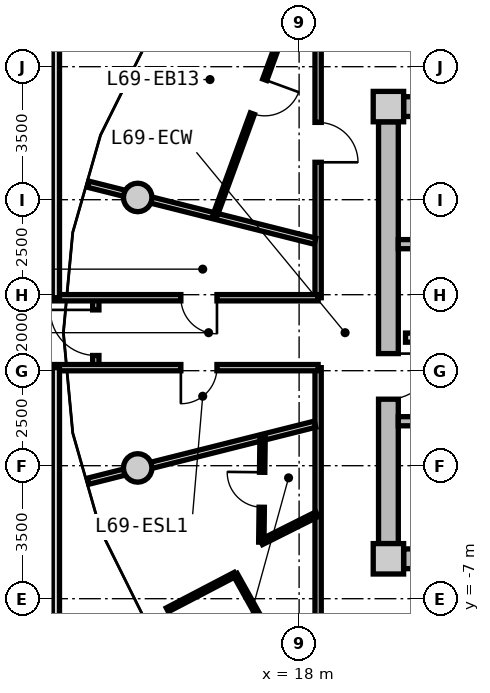
"""IFC4 building model, lengths in metres.
Left out: names, types, materials, properties, quantities, classifications, styles, units other than length and angle.
Written with IfcOpenShell. Run it as: python <this file> out.ifc"""

import sys

from ifc_helpers import new_model, si_unit, direction, frame, frame_2d, origin, origin_2d, place, context, subcontext, project, spatial, rectangle, circle, extrude, source, transform, mapped, element, fill, save


model = new_model("IFC4")
c1 = context("Model", 3, precision=1e-05, world=origin(), true_north=direction((0.0, 1.0)))
c2 = subcontext(c1, "Body", "Model", "MODEL_VIEW")
j1 = project(units=[si_unit("LENGTHUNIT", "METRE"), si_unit("PLANEANGLEUNIT", "RADIAN")], contexts=[c1])
p1 = place(None, origin())
s1 = spatial("IfcSite", under=j1, at=p1, CompositionType="ELEMENT")
p2 = place(p1, origin())
s2 = spatial("IfcBuilding", under=s1, at=p2, CompositionType="ELEMENT")
p3 = place(p2, frame((0.0, 0.0, 223.05)))
s3 = spatial("IfcBuildingStorey", under=s2, at=p3, CompositionType="ELEMENT", Elevation=223.05)
m1 = source(origin(), c2, "Body", "SweptSolid", [
    extrude(rectangle(XDim=0.8, YDim=0.8, at=origin_2d()), origin(), (0.0, 0.0, 1.0), 3.05),
])
for number, where, z_axis, x_axis in (
    (1, (20.35, -5.95, 0.0), (0.0, 0.0, 1.0), (1.0, 0.0, 0.0)),
    (2, (20.35, 5.95, 0.0), (0.0, 0.0, 1.0), (1.0, 0.0, 0.0)),
):
    element("IfcColumn", number, at=place(p3, frame(where, z_axis=z_axis, x_axis=x_axis)), inside=s3, PredefinedType="COLUMN", context=c2, shape_type="MappedRepresentation", body=[
        mapped(m1, transform((0.0, 0.0, 0.0), x_axis=(1.0, 0.0, 0.0), y_axis=(0.0, 1.0, 0.0), z_axis=(0.0, 0.0, 1.0), scale=1.0)),
    ])
m2 = source(origin(), c2, "Body", "SweptSolid", [
    extrude(rectangle(XDim=14.5, YDim=0.52, at=frame_2d((7.25, 0.0))), origin(), (0.0, 0.0, 1.0), 2.76),
])
for number, where, z_axis, x_axis in (
    (3, (20.75, 5.95, 0.0), (0.0, 0.0, 1.0), (1.0, 0.0, 0.0)),
    (4, (35.25, -5.95, 0.0), (0.0, 0.0, 1.0), (-1.0, 0.0, 0.0)),
):
    element("IfcWall", number, at=place(p3, frame(where, z_axis=z_axis, x_axis=x_axis)), inside=s3, PredefinedType="SHEAR", context=c2, shape_type="MappedRepresentation", body=[
        mapped(m2, transform((0.0, 0.0, 0.0), x_axis=(1.0, 0.0, 0.0), y_axis=(0.0, 1.0, 0.0), z_axis=(0.0, 0.0, 1.0), scale=1.0)),
    ])
m3 = source(origin(), c2, "Body", "SweptSolid", [
    extrude(rectangle(XDim=11.1, YDim=0.52, at=frame_2d((5.55, 0.0))), origin(), (0.0, 0.0, 1.0), 2.76),
])
p4 = place(p3, frame((20.35, -5.55, 0.0), z_axis=(0.0, 0.0, 1.0), x_axis=(0.0, 1.0, 0.0)))
e5 = element("IfcWall", 5, at=p4, inside=s3, PredefinedType="SHEAR", context=c2, shape_type="MappedRepresentation", body=[
    mapped(m3, transform((0.0, 0.0, 0.0), x_axis=(1.0, 0.0, 0.0), y_axis=(0.0, 1.0, 0.0), z_axis=(0.0, 0.0, 1.0), scale=1.0)),
])
p5 = place(p4, frame((3.8, 0.0, 0.0)))
e6 = element("IfcOpeningElement", 6, at=p5, cuts=e5, PredefinedType="OPENING", context=c2, shape_type="SweptSolid", body=[
    extrude(rectangle(XDim=1.2, YDim=2.15, at=frame_2d((0.6, 1.075))), frame((0.0, 0.27, 0.0), z_axis=(0.0, -1.0, 0.0), x_axis=(1.0, 0.0, 0.0)), (0.0, 0.0, 1.0), 0.54),
])
m4 = source(origin(), c2, "Body", "SweptSolid", [
    extrude(circle(Radius=0.375, at=origin_2d()), origin(), (0.0, 0.0, 1.0), 3.05),
])
for number, where, z_axis, x_axis in (
    (7, (13.753, 3.559, 0.0), (0.0, 0.0, 1.0), (1.0, 0.0, 0.0)),
    (8, (13.753, -3.559, 0.0), (0.0, 0.0, 1.0), (1.0, 0.0, 0.0)),
):
    element("IfcColumn", number, at=place(p3, frame(where, z_axis=z_axis, x_axis=x_axis)), inside=s3, PredefinedType="COLUMN", context=c2, shape_type="MappedRepresentation", body=[
        mapped(m4, transform((0.0, 0.0, 0.0), x_axis=(1.0, 0.0, 0.0), y_axis=(0.0, 1.0, 0.0), z_axis=(0.0, 0.0, 1.0), scale=1.0)),
    ])
m5 = source(origin(), c2, "Body", "SweptSolid", [
    extrude(rectangle(XDim=7.93, YDim=0.24, at=frame_2d((3.965, 0.0))), origin(), (0.0, 0.0, 1.0), 2.76),
])
p6 = place(p3, frame((20.61, 2.33, 0.0), z_axis=(0.0, 0.0, 1.0), x_axis=(1.0, 0.0, 0.0)))
e9 = element("IfcWall", 9, at=p6, inside=s3, PredefinedType="PARTITIONING", context=c2, shape_type="MappedRepresentation", body=[
    mapped(m5, transform((0.0, 0.0, 0.0), x_axis=(1.0, 0.0, 0.0), y_axis=(0.0, 1.0, 0.0), z_axis=(0.0, 0.0, 1.0), scale=1.0)),
])
p7 = place(p3, frame((20.61, -2.33, 0.0), z_axis=(0.0, 0.0, 1.0), x_axis=(1.0, 0.0, 0.0)))
e10 = element("IfcWall", 10, at=p7, inside=s3, PredefinedType="PARTITIONING", context=c2, shape_type="MappedRepresentation", body=[
    mapped(m5, transform((0.0, 0.0, 0.0), x_axis=(1.0, 0.0, 0.0), y_axis=(0.0, 1.0, 0.0), z_axis=(0.0, 0.0, 1.0), scale=1.0)),
])
p8 = place(p7, frame((1.05, 0.0, 0.0)))
e11 = element("IfcOpeningElement", 11, at=p8, cuts=e10, PredefinedType="OPENING", context=c2, shape_type="SweptSolid", body=[
    extrude(rectangle(XDim=1.1, YDim=2.15, at=frame_2d((0.55, 1.075))), frame((0.0, 0.13, 0.0), z_axis=(0.0, -1.0, 0.0), x_axis=(1.0, 0.0, 0.0)), (0.0, 0.0, 1.0), 0.26),
])
m6 = source(origin(), c2, "Body", "SweptSolid", [
    extrude(rectangle(XDim=7.62, YDim=0.24, at=frame_2d((3.81, 0.0))), origin(), (0.0, 0.0, 1.0), 2.745),
])
p9 = place(p3, frame((20.8, -0.13, 0.0), z_axis=(0.0, 0.0, 1.0), x_axis=(1.0, 0.0, 0.0)))
e12 = element("IfcWall", 12, at=p9, inside=s3, PredefinedType="PARTITIONING", context=c2, shape_type="MappedRepresentation", body=[
    mapped(m6, transform((0.0, 0.0, 0.0), x_axis=(1.0, 0.0, 0.0), y_axis=(0.0, 1.0, 0.0), z_axis=(0.0, 0.0, 1.0), scale=1.0)),
])
p10 = place(p9, frame((6.22, 0.0, 0.0)))
e13 = element("IfcOpeningElement", 13, at=p10, cuts=e12, PredefinedType="OPENING", context=c2, shape_type="SweptSolid", body=[
    extrude(rectangle(XDim=1.0, YDim=2.1, at=frame_2d((0.5, 1.05))), frame((0.0, 0.13, 0.0), z_axis=(0.0, -1.0, 0.0), x_axis=(1.0, 0.0, 0.0)), (0.0, 0.0, 1.0), 0.26),
])
p11 = place(p9, frame((2.4, 0.0, 0.0)))
e14 = element("IfcOpeningElement", 14, at=p11, cuts=e12, PredefinedType="OPENING", context=c2, shape_type="SweptSolid", body=[
    extrude(rectangle(XDim=1.0, YDim=2.1, at=frame_2d((0.5, 1.05))), frame((0.0, 0.13, 0.0), z_axis=(0.0, -1.0, 0.0), x_axis=(1.0, 0.0, 0.0)), (0.0, 0.0, 1.0), 0.26),
])
m7 = source(origin(), c2, "Body", "SweptSolid", [
    extrude(rectangle(XDim=6.88, YDim=0.165, at=frame_2d((3.44, 0.0))), origin(), (0.0, 0.0, 1.0), 2.745),
])
p12 = place(p3, frame((18.5, -7.8, 0.0), z_axis=(0.0, 0.0, 1.0), x_axis=(0.0, 1.0, 0.0)))
e15 = element("IfcWall", 15, at=p12, inside=s3, PredefinedType="PARTITIONING", context=c2, shape_type="MappedRepresentation", body=[
    mapped(m7, transform((0.0, 0.0, 0.0), x_axis=(1.0, 0.0, 0.0), y_axis=(0.0, 1.0, 0.0), z_axis=(0.0, 0.0, 1.0), scale=1.0)),
])
p13 = place(p3, frame((18.5, 0.92, 0.0), z_axis=(0.0, 0.0, 1.0), x_axis=(0.0, 1.0, 0.0)))
e16 = element("IfcWall", 16, at=p13, inside=s3, PredefinedType="PARTITIONING", context=c2, shape_type="MappedRepresentation", body=[
    mapped(m7, transform((0.0, 0.0, 0.0), x_axis=(1.0, 0.0, 0.0), y_axis=(0.0, 1.0, 0.0), z_axis=(0.0, 0.0, 1.0), scale=1.0)),
])
p14 = place(p13, frame((3.564, 0.0, 0.0)))
e17 = element("IfcOpeningElement", 17, at=p14, cuts=e16, PredefinedType="OPENING", context=c2, shape_type="SweptSolid", body=[
    extrude(rectangle(XDim=1.05, YDim=2.15, at=frame_2d((0.525, 1.075))), frame((0.0, 0.093, 0.0), z_axis=(0.0, -1.0, 0.0), x_axis=(1.0, 0.0, 0.0)), (0.0, 0.0, 1.0), 0.185),
])
m8 = source(origin(), c2, "Body", "SweptSolid", [
    extrude(rectangle(XDim=6.157, YDim=0.165, at=frame_2d((3.079, 0.0))), origin(), (0.0, 0.0, 1.0), 2.345),
])
for number, where, z_axis, x_axis in (
    (18, (18.42, 2.407, 0.0), (0.0, 0.0, 1.0), (-0.97, 0.244, 0.0)),
    (19, (18.42, -2.407, 0.0), (0.0, 0.0, 1.0), (-0.97, -0.244, 0.0)),
):
    element("IfcWall", number, at=place(p3, frame(where, z_axis=z_axis, x_axis=x_axis)), inside=s3, PredefinedType="PARTITIONING", context=c2, shape_type="MappedRepresentation", body=[
        mapped(m8, transform((0.0, 0.0, 0.0), x_axis=(1.0, 0.0, 0.0), y_axis=(0.0, 1.0, 0.0), z_axis=(0.0, 0.0, 1.0), scale=1.0)),
    ])
m9 = source(origin(), c2, "Body", "SweptSolid", [
    extrude(rectangle(XDim=6.69, YDim=0.115, at=frame_2d((3.345, 0.0))), origin(), (0.0, 0.0, 1.0), 2.745),
])
p15 = place(p3, frame((18.083, 9.352, 0.0), z_axis=(0.0, 0.0, 1.0), x_axis=(-0.343693784919, -0.939081776102, 0.0)))
e20 = element("IfcWall", 20, at=p15, inside=s3, PredefinedType="PARTITIONING", context=c2, shape_type="MappedRepresentation", body=[
    mapped(m9, transform((0.0, 0.0, 0.0), x_axis=(1.0, 0.0, 0.0), y_axis=(0.0, 1.0, 0.0), z_axis=(0.0, 0.0, 1.0), scale=1.0)),
])
p16 = place(p15, frame((2.87, 0.0, 0.0)))
e21 = element("IfcOpeningElement", 21, at=p16, cuts=e20, PredefinedType="OPENING", context=c2, shape_type="SweptSolid", body=[
    extrude(rectangle(XDim=0.95, YDim=2.1, at=frame_2d((0.475, 1.05))), frame((0.0, 0.067, 0.0), z_axis=(0.0, -1.0, 0.0), x_axis=(1.0, 0.0, 0.0)), (0.0, 0.0, 1.0), 0.135),
])
m10 = source(origin(), c2, "Body", "SweptSolid", [
    extrude(rectangle(XDim=1.638, YDim=0.14, at=frame_2d((0.819, 0.0))), origin(), (0.0, 0.0, 1.0), 2.745),
])
p17 = place(p3, frame((18.47, -4.778, 0.0), z_axis=(0.0, 0.0, 1.0), x_axis=(-0.893919977945, -0.448226586707, 0.0)))
e22 = element("IfcWall", 22, at=p17, inside=s3, PredefinedType="PARTITIONING", context=c2, shape_type="MappedRepresentation", body=[
    mapped(m10, transform((0.0, 0.0, 0.0), x_axis=(1.0, 0.0, 0.0), y_axis=(0.0, 1.0, 0.0), z_axis=(0.0, 0.0, 1.0), scale=1.0)),
])
m11 = source(origin(), c2, "Body", "SweptSolid", [
    extrude(rectangle(XDim=2.759, YDim=0.14, at=frame_2d((1.379, 0.0))), origin(), (0.0, 0.0, 1.0), 2.745),
])
p18 = place(p3, frame((17.005, -5.513, 0.0), z_axis=(0.0, 0.0, 1.0), x_axis=(0.01194710728, 0.999928630767, 0.0)))
e23 = element("IfcWall", 23, at=p18, inside=s3, PredefinedType="PARTITIONING", context=c2, shape_type="MappedRepresentation", body=[
    mapped(m11, transform((0.0, 0.0, 0.0), x_axis=(1.0, 0.0, 0.0), y_axis=(0.0, 1.0, 0.0), z_axis=(0.0, 0.0, 1.0), scale=1.0)),
])
p19 = place(p18, frame((0.919, 0.0, 0.0)))
e24 = element("IfcOpeningElement", 24, at=p19, cuts=e23, PredefinedType="OPENING", context=c2, shape_type="SweptSolid", body=[
    extrude(rectangle(XDim=0.92, YDim=2.1, at=frame_2d((0.46, 1.05))), frame((0.0, 0.08, 0.0), z_axis=(0.0, -1.0, 0.0), x_axis=(1.0, 0.0, 0.0)), (0.0, 0.0, 1.0), 0.16),
])
m12 = source(origin(), c2, "Body", "SweptSolid", [
    extrude(rectangle(XDim=2.015, YDim=0.115, at=frame_2d((1.007, 0.0))), origin(), (0.0, 0.0, 1.0), 2.745),
])
p20 = place(p3, frame((16.318, -6.36, 0.0), z_axis=(0.0, 0.0, 1.0), x_axis=(-0.886437892009, -0.462847559797, 0.0)))
e25 = element("IfcWall", 25, at=p20, inside=s3, PredefinedType="PARTITIONING", context=c2, shape_type="MappedRepresentation", body=[
    mapped(m12, transform((0.0, 0.0, 0.0), x_axis=(1.0, 0.0, 0.0), y_axis=(0.0, 1.0, 0.0), z_axis=(0.0, 0.0, 1.0), scale=1.0)),
])
m13 = source(origin(), c2, "Body", "SweptSolid", [
    extrude(rectangle(XDim=3.493, YDim=0.115, at=frame_2d((1.746, 0.0))), origin(), (0.0, 0.0, 1.0), 2.745),
])
p21 = place(p3, frame((16.318, -6.36, 0.0), z_axis=(0.0, 0.0, 1.0), x_axis=(0.487896553961, -0.872901456427, 0.0)))
e26 = element("IfcWall", 26, at=p21, inside=s3, PredefinedType="PARTITIONING", context=c2, shape_type="MappedRepresentation", body=[
    mapped(m13, transform((0.0, 0.0, 0.0), x_axis=(1.0, 0.0, 0.0), y_axis=(0.0, 1.0, 0.0), z_axis=(0.0, 0.0, 1.0), scale=1.0)),
])
p22 = place(p21, frame((1.271, 0.0, 0.0)))
e27 = element("IfcOpeningElement", 27, at=p22, cuts=e26, PredefinedType="OPENING", context=c2, shape_type="SweptSolid", body=[
    extrude(rectangle(XDim=0.95, YDim=2.1, at=frame_2d((0.475, 1.05))), frame((0.0, 0.067, 0.0), z_axis=(0.0, -1.0, 0.0), x_axis=(1.0, 0.0, 0.0)), (0.0, 0.0, 1.0), 0.135),
])
m14 = source(origin(), c2, "Body", "SweptSolid", [
    extrude(rectangle(XDim=1.84, YDim=0.165, at=frame_2d((0.92, 0.0))), origin(), (0.0, 0.0, 1.0), 2.745),
])
p23 = place(p3, frame((12.65, -0.92, 0.0), z_axis=(0.0, 0.0, 1.0), x_axis=(0.0, 1.0, 0.0)))
e28 = element("IfcWall", 28, at=p23, inside=s3, PredefinedType="PARTITIONING", context=c2, shape_type="MappedRepresentation", body=[
    mapped(m14, transform((0.0, 0.0, 0.0), x_axis=(1.0, 0.0, 0.0), y_axis=(0.0, 1.0, 0.0), z_axis=(0.0, 0.0, 1.0), scale=1.0)),
])
p24 = place(p23, frame((0.32, 0.0, 0.0)))
e29 = element("IfcOpeningElement", 29, at=p24, cuts=e28, PredefinedType="OPENING", context=c2, shape_type="SweptSolid", body=[
    extrude(rectangle(XDim=1.2, YDim=2.15, at=frame_2d((0.6, 1.075))), frame((0.0, 0.093, 0.0), z_axis=(0.0, -1.0, 0.0), x_axis=(1.0, 0.0, 0.0)), (0.0, 0.0, 1.0), 0.185),
])
m15 = source(origin(), c2, "Body", "SweptSolid", [
    extrude(rectangle(XDim=37.0, YDim=0.165, at=frame_2d((18.5, 0.0))), origin(), (0.0, 0.0, 1.0), 2.745),
])
p25 = place(p3, frame((-18.5, -0.92, 0.0), z_axis=(0.0, 0.0, 1.0), x_axis=(1.0, 0.0, 0.0)))
e30 = element("IfcWall", 30, at=p25, inside=s3, PredefinedType="PARTITIONING", context=c2, shape_type="MappedRepresentation", body=[
    mapped(m15, transform((0.0, 0.0, 0.0), x_axis=(1.0, 0.0, 0.0), y_axis=(0.0, 1.0, 0.0), z_axis=(0.0, 0.0, 1.0), scale=1.0)),
])
p26 = place(p25, frame((2.662, 0.0, 0.0)))
e31 = element("IfcOpeningElement", 31, at=p26, cuts=e30, PredefinedType="OPENING", context=c2, shape_type="SweptSolid", body=[
    extrude(rectangle(XDim=0.95, YDim=2.1, at=frame_2d((0.475, 1.05))), frame((0.0, 0.093, 0.0), z_axis=(0.0, -1.0, 0.0), x_axis=(1.0, 0.0, 0.0)), (0.0, 0.0, 1.0), 0.185),
])
p27 = place(p25, frame((33.388, 0.0, 0.0)))
e32 = element("IfcOpeningElement", 32, at=p27, cuts=e30, PredefinedType="OPENING", context=c2, shape_type="SweptSolid", body=[
    extrude(rectangle(XDim=0.95, YDim=2.1, at=frame_2d((0.475, 1.05))), frame((0.0, 0.093, 0.0), z_axis=(0.0, -1.0, 0.0), x_axis=(1.0, 0.0, 0.0)), (0.0, 0.0, 1.0), 0.185),
])
p28 = place(p25, frame((9.075, 0.0, 0.0)))
e33 = element("IfcOpeningElement", 33, at=p28, cuts=e30, PredefinedType="OPENING", context=c2, shape_type="SweptSolid", body=[
    extrude(rectangle(XDim=1.25, YDim=2.2, at=frame_2d((0.625, 1.1))), frame((0.0, 0.093, 0.0), z_axis=(0.0, -1.0, 0.0), x_axis=(1.0, 0.0, 0.0)), (0.0, 0.0, 1.0), 0.185),
])
p29 = place(p25, frame((14.875, 0.0, 0.0)))
e34 = element("IfcOpeningElement", 34, at=p29, cuts=e30, PredefinedType="OPENING", context=c2, shape_type="SweptSolid", body=[
    extrude(rectangle(XDim=1.25, YDim=2.2, at=frame_2d((0.625, 1.1))), frame((0.0, 0.093, 0.0), z_axis=(0.0, -1.0, 0.0), x_axis=(1.0, 0.0, 0.0)), (0.0, 0.0, 1.0), 0.185),
])
p30 = place(p25, frame((23.03, 0.0, 0.0)))
e35 = element("IfcOpeningElement", 35, at=p30, cuts=e30, PredefinedType="OPENING", context=c2, shape_type="SweptSolid", body=[
    extrude(rectangle(XDim=1.25, YDim=2.2, at=frame_2d((0.625, 1.1))), frame((0.0, 0.093, 0.0), z_axis=(0.0, -1.0, 0.0), x_axis=(1.0, 0.0, 0.0)), (0.0, 0.0, 1.0), 0.185),
])
p31 = place(p3, frame((-18.5, 0.92, 0.0), z_axis=(0.0, 0.0, 1.0), x_axis=(1.0, 0.0, 0.0)))
e36 = element("IfcWall", 36, at=p31, inside=s3, PredefinedType="PARTITIONING", context=c2, shape_type="MappedRepresentation", body=[
    mapped(m15, transform((0.0, 0.0, 0.0), x_axis=(1.0, 0.0, 0.0), y_axis=(0.0, 1.0, 0.0), z_axis=(0.0, 0.0, 1.0), scale=1.0)),
])
p32 = place(p31, frame((2.662, 0.0, 0.0)))
e37 = element("IfcOpeningElement", 37, at=p32, cuts=e36, PredefinedType="OPENING", context=c2, shape_type="SweptSolid", body=[
    extrude(rectangle(XDim=0.95, YDim=2.1, at=frame_2d((0.475, 1.05))), frame((0.0, 0.093, 0.0), z_axis=(0.0, -1.0, 0.0), x_axis=(1.0, 0.0, 0.0)), (0.0, 0.0, 1.0), 0.185),
])
p33 = place(p31, frame((33.388, 0.0, 0.0)))
e38 = element("IfcOpeningElement", 38, at=p33, cuts=e36, PredefinedType="OPENING", context=c2, shape_type="SweptSolid", body=[
    extrude(rectangle(XDim=0.95, YDim=2.1, at=frame_2d((0.475, 1.05))), frame((0.0, 0.093, 0.0), z_axis=(0.0, -1.0, 0.0), x_axis=(1.0, 0.0, 0.0)), (0.0, 0.0, 1.0), 0.185),
])
p34 = place(p31, frame((7.64, 0.0, 0.0)))
e39 = element("IfcOpeningElement", 39, at=p34, cuts=e36, PredefinedType="OPENING", context=c2, shape_type="SweptSolid", body=[
    extrude(rectangle(XDim=0.92, YDim=2.1, at=frame_2d((0.46, 1.05))), frame((0.0, 0.093, 0.0), z_axis=(0.0, -1.0, 0.0), x_axis=(1.0, 0.0, 0.0)), (0.0, 0.0, 1.0), 0.185),
])
p35 = place(p31, frame((10.275, 0.0, 0.0)))
e40 = element("IfcOpeningElement", 40, at=p35, cuts=e36, PredefinedType="OPENING", context=c2, shape_type="SweptSolid", body=[
    extrude(rectangle(XDim=1.25, YDim=2.2, at=frame_2d((0.625, 1.1))), frame((0.0, 0.093, 0.0), z_axis=(0.0, -1.0, 0.0), x_axis=(1.0, 0.0, 0.0)), (0.0, 0.0, 1.0), 0.185),
])
p36 = place(p31, frame((14.875, 0.0, 0.0)))
e41 = element("IfcOpeningElement", 41, at=p36, cuts=e36, PredefinedType="OPENING", context=c2, shape_type="SweptSolid", body=[
    extrude(rectangle(XDim=1.25, YDim=2.2, at=frame_2d((0.625, 1.1))), frame((0.0, 0.093, 0.0), z_axis=(0.0, -1.0, 0.0), x_axis=(1.0, 0.0, 0.0)), (0.0, 0.0, 1.0), 0.185),
])
p37 = place(p31, frame((23.03, 0.0, 0.0)))
e42 = element("IfcOpeningElement", 42, at=p37, cuts=e36, PredefinedType="OPENING", context=c2, shape_type="SweptSolid", body=[
    extrude(rectangle(XDim=1.25, YDim=2.2, at=frame_2d((0.625, 1.1))), frame((0.0, 0.093, 0.0), z_axis=(0.0, -1.0, 0.0), x_axis=(1.0, 0.0, 0.0)), (0.0, 0.0, 1.0), 0.185),
])
m16 = source(origin(), c2, "Body", "SweptSolid", [
    extrude(rectangle(XDim=9.88, YDim=0.19, at=frame_2d((4.94, 0.0))), origin(), (0.0, 0.0, 1.0), 2.745),
])
for number, where, z_axis, x_axis in (
    (43, (11.6, -10.8, 0.0), (0.0, 0.0, 1.0), (0.0, 1.0, 0.0)),
    (44, (11.6, 0.92, 0.0), (0.0, 0.0, 1.0), (0.0, 1.0, 0.0)),
):
    element("IfcWall", number, at=place(p3, frame(where, z_axis=z_axis, x_axis=x_axis)), inside=s3, PredefinedType="PARTITIONING", context=c2, shape_type="MappedRepresentation", body=[
        mapped(m16, transform((0.0, 0.0, 0.0), x_axis=(1.0, 0.0, 0.0), y_axis=(0.0, 1.0, 0.0), z_axis=(0.0, 0.0, 1.0), scale=1.0)),
    ])
m17 = source(origin(), c2, "Body", "SweptSolid", [
    extrude(rectangle(XDim=1.2, YDim=2.15, at=frame_2d((0.6, 1.075))), frame((0.0, 0.025, 0.0), z_axis=(0.0, -1.0, 0.0), x_axis=(1.0, 0.0, 0.0)), (0.0, 0.0, 1.0), 0.05),
])
p38 = place(p5, frame((1.2, 0.0, 0.0), z_axis=(0.0, 0.0, 1.0), x_axis=(-1.0, 0.0, 0.0)))
e45 = element("IfcDoor", 45, at=p38, inside=s3, OperationType="SINGLE_SWING_LEFT", PredefinedType="DOOR", context=c2, shape_type="MappedRepresentation", body=[
    mapped(m17, transform((0.0, 0.0, 0.0), x_axis=(1.0, 0.0, 0.0), y_axis=(0.0, 1.0, 0.0), z_axis=(0.0, 0.0, 1.0), scale=1.0)),
])
fill(e6, e45)
m18 = source(origin(), c2, "Body", "SweptSolid", [
    extrude(rectangle(XDim=0.95, YDim=2.1, at=frame_2d((0.475, 1.05))), frame((0.0, 0.025, 0.0), z_axis=(0.0, -1.0, 0.0), x_axis=(1.0, 0.0, 0.0)), (0.0, 0.0, 1.0), 0.05),
])
p39 = place(p27, frame((0.95, 0.0, 0.0), z_axis=(0.0, 0.0, 1.0), x_axis=(-1.0, 0.0, 0.0)))
e46 = element("IfcDoor", 46, at=p39, inside=s3, OperationType="SINGLE_SWING_RIGHT", PredefinedType="DOOR", context=c2, shape_type="MappedRepresentation", body=[
    mapped(m18, transform((0.0, 0.0, 0.0), x_axis=(1.0, 0.0, 0.0), y_axis=(0.0, 1.0, 0.0), z_axis=(0.0, 0.0, 1.0), scale=1.0)),
])
fill(e32, e46)
p40 = place(p33, frame((0.95, 0.0, 0.0), z_axis=(0.0, 0.0, 1.0), x_axis=(-1.0, 0.0, 0.0)))
e47 = element("IfcDoor", 47, at=p40, inside=s3, OperationType="SINGLE_SWING_LEFT", PredefinedType="DOOR", context=c2, shape_type="MappedRepresentation", body=[
    mapped(m18, transform((0.0, 0.0, 0.0), x_axis=(1.0, 0.0, 0.0), y_axis=(0.0, 1.0, 0.0), z_axis=(0.0, 0.0, 1.0), scale=1.0)),
])
fill(e38, e47)
m19 = source(origin(), c2, "Body", "SweptSolid", [
    extrude(rectangle(XDim=1.05, YDim=2.15, at=frame_2d((0.525, 1.075))), frame((0.0, 0.025, 0.0), z_axis=(0.0, -1.0, 0.0), x_axis=(1.0, 0.0, 0.0)), (0.0, 0.0, 1.0), 0.05),
])
p41 = place(p14, frame((1.05, 0.0, 0.0), z_axis=(0.0, 0.0, 1.0), x_axis=(-1.0, 0.0, 0.0)))
e48 = element("IfcDoor", 48, at=p41, inside=s3, OperationType="SINGLE_SWING_RIGHT", PredefinedType="DOOR", context=c2, shape_type="MappedRepresentation", body=[
    mapped(m19, transform((0.0, 0.0, 0.0), x_axis=(1.0, 0.0, 0.0), y_axis=(0.0, 1.0, 0.0), z_axis=(0.0, 0.0, 1.0), scale=1.0)),
])
fill(e17, e48)
p42 = place(p16, origin())
e49 = element("IfcDoor", 49, at=p42, inside=s3, OperationType="SINGLE_SWING_LEFT", PredefinedType="DOOR", context=c2, shape_type="MappedRepresentation", body=[
    mapped(m18, transform((0.0, 0.0, 0.0), x_axis=(1.0, 0.0, 0.0), y_axis=(0.0, 1.0, 0.0), z_axis=(0.0, 0.0, 1.0), scale=1.0)),
])
fill(e21, e49)
m20 = source(origin(), c2, "Body", "SweptSolid", [
    extrude(rectangle(XDim=0.92, YDim=2.1, at=frame_2d((0.46, 1.05))), frame((0.0, 0.025, 0.0), z_axis=(0.0, -1.0, 0.0), x_axis=(1.0, 0.0, 0.0)), (0.0, 0.0, 1.0), 0.05),
])
p43 = place(p19, origin())
e50 = element("IfcDoor", 50, at=p43, inside=s3, OperationType="SINGLE_SWING_RIGHT", PredefinedType="DOOR", context=c2, shape_type="MappedRepresentation", body=[
    mapped(m20, transform((0.0, 0.0, 0.0), x_axis=(1.0, 0.0, 0.0), y_axis=(0.0, 1.0, 0.0), z_axis=(0.0, 0.0, 1.0), scale=1.0)),
])
fill(e24, e50)
p44 = place(p24, origin())
e51 = element("IfcDoor", 51, at=p44, inside=s3, OperationType="SINGLE_SWING_RIGHT", PredefinedType="DOOR", context=c2, shape_type="MappedRepresentation", body=[
    mapped(m17, transform((0.0, 0.0, 0.0), x_axis=(1.0, 0.0, 0.0), y_axis=(0.0, 1.0, 0.0), z_axis=(0.0, 0.0, 1.0), scale=1.0)),
])
fill(e29, e51)
save(model, sys.argv[1])
